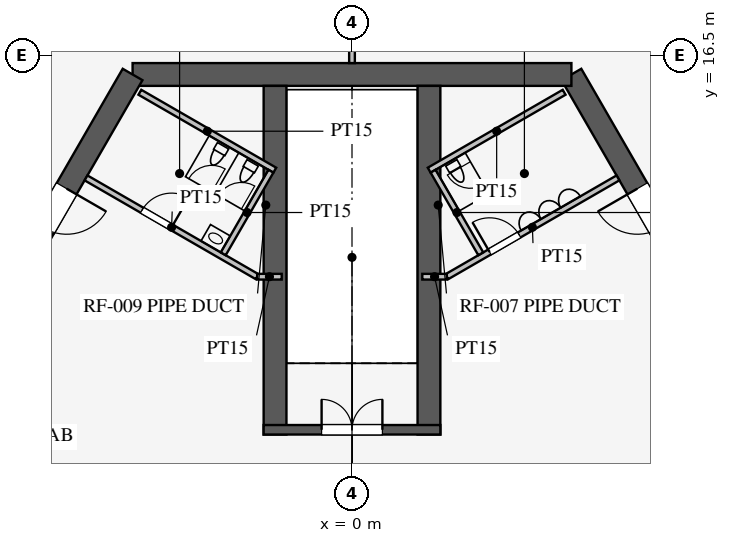
"""IFC4 building model, lengths in metres.
Left out: names, types, materials, properties, quantities, classifications, styles, units other than length and angle.
Written with IfcOpenShell. Run it as: python <this file> out.ifc"""

import sys

from ifc_helpers import new_model, si_unit, direction, frame, frame_2d, origin, place, context, subcontext, project, spatial, polyline, rectangle, outline, extrude, element, fill, save


model = new_model("IFC4")
c1 = context("Model", 3, precision=1e-05, world=origin(), true_north=direction((0.0, 1.0)))
c2 = subcontext(c1, "Body", "Model", "MODEL_VIEW")
j1 = project(units=[si_unit("LENGTHUNIT", "METRE"), si_unit("PLANEANGLEUNIT", "RADIAN")], contexts=[c1])
p1 = place(None, origin())
s1 = spatial("IfcSite", under=j1, at=p1, CompositionType="ELEMENT")
p2 = place(p1, origin())
s2 = spatial("IfcBuilding", under=s1, at=p2, CompositionType="ELEMENT")
p3 = place(p2, frame((0.0, 0.0, 328.5)))
s3 = spatial("IfcBuildingStorey", under=s2, at=p3, CompositionType="ELEMENT", Elevation=328.5)
p4 = place(p3, frame((16.743, -3.0, 0.0), z_axis=(0.0, 0.0, 1.0), x_axis=(-0.500002442456, 0.866023993627, 0.0)))
e1 = element("IfcWall", 1, at=p4, inside=s3, PredefinedType="SHEAR", context=c2, shape_type="SweptSolid", body=[
    extrude(outline(polyline([(0.0, 0.0), (21.939, 0.0), (21.939, 21.833), (0.0, 12.973), (0.0, 0.0)])), frame((0.0, 0.3, 0.0), z_axis=(0.0, -1.0, 0.0), x_axis=(1.0, 0.0, 0.0)), (0.0, 0.0, 1.0), 0.6),
])
p5 = place(p4, frame((17.27, 0.0, 0.0)))
e2 = element("IfcOpeningElement", 2, at=p5, cuts=e1, PredefinedType="OPENING", context=c2, shape_type="SweptSolid", body=[
    extrude(rectangle(XDim=1.2, YDim=2.1, at=frame_2d((0.6, 1.05))), frame((0.0, 0.31, 0.0), z_axis=(0.0, -1.0, 0.0), x_axis=(1.0, 0.0, 0.0)), (0.0, 0.0, 1.0), 0.62),
])
p6 = place(p4, frame((3.47, 0.0, 0.0)))
e3 = element("IfcOpeningElement", 3, at=p6, cuts=e1, PredefinedType="OPENING", context=c2, shape_type="SweptSolid", body=[
    extrude(rectangle(XDim=1.2, YDim=2.1, at=frame_2d((0.6, 1.05))), frame((0.0, 0.31, 0.0), z_axis=(0.0, -1.0, 0.0), x_axis=(1.0, 0.0, 0.0)), (0.0, 0.0, 1.0), 0.62),
])
p7 = place(p3, frame((5.773, 16.0, 0.0), z_axis=(0.0, 0.0, 1.0), x_axis=(-1.0, 0.0, 0.0)))
e4 = element("IfcWall", 4, at=p7, inside=s3, PredefinedType="SHEAR", context=c2, shape_type="SweptSolid", body=[
    extrude(outline(polyline([(0.0, 0.0), (11.547, 0.0), (11.547, 21.833), (0.0, 21.833), (0.0, 0.0)])), frame((0.0, 0.3, 0.0), z_axis=(0.0, -1.0, 0.0), x_axis=(1.0, 0.0, 0.0)), (0.0, 0.0, 1.0), 0.6),
])
p8 = place(p3, frame((-5.773, 16.0, 0.0), z_axis=(0.0, 0.0, 1.0), x_axis=(-0.500002442456, -0.866023993627, 0.0)))
e5 = element("IfcWall", 5, at=p8, inside=s3, PredefinedType="SHEAR", context=c2, shape_type="SweptSolid", body=[
    extrude(outline(polyline([(0.0, 0.0), (21.939, 0.0), (21.939, 12.973), (0.0, 21.833), (0.0, 0.0)])), frame((0.0, 0.3, 0.0), z_axis=(0.0, -1.0, 0.0), x_axis=(1.0, 0.0, 0.0)), (0.0, 0.0, 1.0), 0.6),
])
p9 = place(p8, frame((17.27, 0.0, 0.0)))
e6 = element("IfcOpeningElement", 6, at=p9, cuts=e5, PredefinedType="OPENING", context=c2, shape_type="SweptSolid", body=[
    extrude(rectangle(XDim=1.2, YDim=2.1, at=frame_2d((0.6, 1.05))), frame((0.0, 0.31, 0.0), z_axis=(0.0, -1.0, 0.0), x_axis=(1.0, 0.0, 0.0)), (0.0, 0.0, 1.0), 0.62),
])
p10 = place(p8, frame((3.47, 0.0, 0.0)))
e7 = element("IfcOpeningElement", 7, at=p10, cuts=e5, PredefinedType="OPENING", context=c2, shape_type="SweptSolid", body=[
    extrude(rectangle(XDim=1.2, YDim=2.1, at=frame_2d((0.6, 1.05))), frame((0.0, 0.31, 0.0), z_axis=(0.0, -1.0, 0.0), x_axis=(1.0, 0.0, 0.0)), (0.0, 0.0, 1.0), 0.62),
])
for number, where, z_axis, x_axis in (
    (8, (2.025, 6.525, 0.0), (0.0, 0.0, 1.0), (0.0, 1.0, 0.0)),
    (9, (-2.025, 6.525, 0.0), (0.0, 0.0, 1.0), (0.0, 1.0, 0.0)),
):
    element("IfcWall", number, at=place(p3, frame(where, z_axis=z_axis, x_axis=x_axis)), inside=s3, PredefinedType="SHEAR", context=c2, shape_type="SweptSolid", body=[
        extrude(rectangle(XDim=9.175, YDim=0.6, at=frame_2d((4.587, 0.0))), origin(), (0.0, 0.0, 1.0), 3.2),
    ])
p11 = place(p3, frame((2.325, 6.65, 0.0), z_axis=(0.0, 0.0, 1.0), x_axis=(-1.0, 0.0, 0.0)))
e10 = element("IfcWall", 10, at=p11, inside=s3, PredefinedType="SHEAR", context=c2, shape_type="SweptSolid", body=[
    extrude(rectangle(XDim=4.65, YDim=0.25, at=frame_2d((2.325, 0.0))), origin(), (0.0, 0.0, 1.0), 3.2),
])
p12 = place(p11, frame((1.525, 0.0, 0.0)))
e11 = element("IfcOpeningElement", 11, at=p12, cuts=e10, PredefinedType="OPENING", context=c2, shape_type="SweptSolid", body=[
    extrude(rectangle(XDim=1.6, YDim=2.1, at=frame_2d((0.8, 1.05))), frame((0.0, 0.135, 0.0), z_axis=(0.0, -1.0, 0.0), x_axis=(1.0, 0.0, 0.0)), (0.0, 0.0, 1.0), 0.27),
])
p13 = place(p3, frame((2.495, 10.678, 0.0), z_axis=(0.0, 0.0, 1.0), x_axis=(0.866021400173, 0.500006934395, 0.0)))
e12 = element("IfcWall", 12, at=p13, inside=s3, PredefinedType="PARTITIONING", context=c2, shape_type="SweptSolid", body=[
    extrude(rectangle(XDim=5.2, YDim=0.15, at=frame_2d((2.6, 0.0))), origin(), (0.0, 0.0, 1.0), 3.2),
])
p14 = place(p13, frame((1.3, 0.0, 0.0)))
e13 = element("IfcOpeningElement", 13, at=p14, cuts=e12, PredefinedType="OPENING", context=c2, shape_type="SweptSolid", body=[
    extrude(rectangle(XDim=0.9, YDim=2.1, at=frame_2d((0.45, 1.05))), frame((0.0, 0.085, 0.0), z_axis=(0.0, -1.0, 0.0), x_axis=(1.0, 0.0, 0.0)), (0.0, 0.0, 1.0), 0.17),
])
p15 = place(p3, frame((-2.495, 10.678, 0.0), z_axis=(0.0, 0.0, 1.0), x_axis=(-0.866021400173, 0.500006934395, 0.0)))
e14 = element("IfcWall", 14, at=p15, inside=s3, PredefinedType="PARTITIONING", context=c2, shape_type="SweptSolid", body=[
    extrude(rectangle(XDim=5.2, YDim=0.15, at=frame_2d((2.6, 0.0))), origin(), (0.0, 0.0, 1.0), 3.2),
])
p16 = place(p15, frame((2.6, 0.0, 0.0)))
e15 = element("IfcOpeningElement", 15, at=p16, cuts=e14, PredefinedType="OPENING", context=c2, shape_type="SweptSolid", body=[
    extrude(rectangle(XDim=0.9, YDim=2.1, at=frame_2d((0.45, 1.05))), frame((0.0, 0.085, 0.0), z_axis=(0.0, -1.0, 0.0), x_axis=(1.0, 0.0, 0.0)), (0.0, 0.0, 1.0), 0.17),
])
for number, where, z_axis, x_axis in (
    (16, (2.495, 10.678, 0.0), (0.0, 0.0, 1.0), (-1.0, 0.0, 0.0)),
    (17, (-2.495, 10.678, 0.0), (0.0, 0.0, 1.0), (1.0, 0.0, 0.0)),
):
    element("IfcWall", number, at=place(p3, frame(where, z_axis=z_axis, x_axis=x_axis)), inside=s3, PredefinedType="PARTITIONING", context=c2, shape_type="SweptSolid", body=[
        extrude(rectangle(XDim=0.645, YDim=0.15, at=frame_2d((0.323, 0.0))), origin(), (0.0, 0.0, 1.0), 3.2),
    ])
p17 = place(p3, frame((2.031, 13.482, 0.0), z_axis=(0.0, 0.0, 1.0), x_axis=(0.866050731258, 0.499956128963, 0.0)))
e18 = element("IfcWall", 18, at=p17, inside=s3, PredefinedType="PARTITIONING", context=c2, shape_type="SweptSolid", body=[
    extrude(rectangle(XDim=4.1, YDim=0.15, at=frame_2d((2.05, 0.0))), origin(), (0.0, 0.0, 1.0), 3.2),
])
p18 = place(p3, frame((3.389, 11.281, 0.0), z_axis=(0.0, 0.0, 1.0), x_axis=(-0.499989096993, 0.866031698547, 0.0)))
e19 = element("IfcWall", 19, at=p18, inside=s3, PredefinedType="PARTITIONING", context=c2, shape_type="SweptSolid", body=[
    extrude(rectangle(XDim=2.51, YDim=0.15, at=frame_2d((1.255, 0.0))), origin(), (0.0, 0.0, 1.0), 3.2),
])
p19 = place(p3, frame((-2.031, 13.482, 0.0), z_axis=(0.0, 0.0, 1.0), x_axis=(-0.866050731258, 0.499956128963, 0.0)))
e20 = element("IfcWall", 20, at=p19, inside=s3, PredefinedType="PARTITIONING", context=c2, shape_type="SweptSolid", body=[
    extrude(rectangle(XDim=4.1, YDim=0.15, at=frame_2d((2.05, 0.0))), origin(), (0.0, 0.0, 1.0), 3.2),
])
p20 = place(p3, frame((-3.389, 11.281, 0.0), z_axis=(0.0, 0.0, 1.0), x_axis=(0.499989096993, 0.866031698547, 0.0)))
e21 = element("IfcWall", 21, at=p20, inside=s3, PredefinedType="PARTITIONING", context=c2, shape_type="SweptSolid", body=[
    extrude(rectangle(XDim=2.51, YDim=0.15, at=frame_2d((1.255, 0.0))), origin(), (0.0, 0.0, 1.0), 3.2),
])
p21 = place(p3, frame((0.0, 16.3, 0.0), z_axis=(0.0, 0.0, 1.0), x_axis=(0.0, 1.0, 0.0)))
e22 = element("IfcWall", 22, at=p21, inside=s3, PredefinedType="PARTITIONING", context=c2, shape_type="SweptSolid", body=[
    extrude(rectangle(XDim=13.45, YDim=0.15, at=frame_2d((6.725, 0.0))), origin(), (0.0, 0.0, 1.0), 3.2),
])
p22 = place(p14, origin())
e23 = element("IfcDoor", 23, at=p22, inside=s3, OperationType="SINGLE_SWING_LEFT", PredefinedType="DOOR", context=c2, shape_type="SweptSolid", body=[
    extrude(rectangle(XDim=0.9, YDim=2.1, at=frame_2d((0.45, 1.05))), frame((0.0, 0.025, 0.0), z_axis=(0.0, -1.0, 0.0), x_axis=(1.0, 0.0, 0.0)), (0.0, 0.0, 1.0), 0.05),
])
fill(e13, e23)
p23 = place(p16, frame((0.9, 0.0, 0.0), z_axis=(0.0, 0.0, 1.0), x_axis=(-1.0, 0.0, 0.0)))
e24 = element("IfcDoor", 24, at=p23, inside=s3, OperationType="SINGLE_SWING_RIGHT", PredefinedType="DOOR", context=c2, shape_type="SweptSolid", body=[
    extrude(rectangle(XDim=0.9, YDim=2.1, at=frame_2d((0.45, 1.05))), frame((0.0, 0.025, 0.0), z_axis=(0.0, -1.0, 0.0), x_axis=(1.0, 0.0, 0.0)), (0.0, 0.0, 1.0), 0.05),
])
fill(e15, e24)
p24 = place(p12, frame((1.6, 0.0, 0.0), z_axis=(0.0, 0.0, 1.0), x_axis=(-1.0, 0.0, 0.0)))
e25 = element("IfcDoor", 25, at=p24, inside=s3, OperationType="DOUBLE_DOOR_SINGLE_SWING", PredefinedType="DOOR", context=c2, shape_type="SweptSolid", body=[
    extrude(rectangle(XDim=1.6, YDim=2.1, at=frame_2d((0.8, 1.05))), frame((0.0, 0.025, 0.0), z_axis=(0.0, -1.0, 0.0), x_axis=(1.0, 0.0, 0.0)), (0.0, 0.0, 1.0), 0.05),
])
fill(e11, e25)
p25 = place(p5, origin())
e26 = element("IfcDoor", 26, at=p25, inside=s3, OperationType="SINGLE_SWING_RIGHT", PredefinedType="DOOR", context=c2, shape_type="SweptSolid", body=[
    extrude(rectangle(XDim=1.2, YDim=2.1, at=frame_2d((0.6, 1.05))), frame((0.0, 0.025, 0.0), z_axis=(0.0, -1.0, 0.0), x_axis=(1.0, 0.0, 0.0)), (0.0, 0.0, 1.0), 0.05),
])
fill(e2, e26)
p26 = place(p10, origin())
e27 = element("IfcDoor", 27, at=p26, inside=s3, OperationType="SINGLE_SWING_LEFT", PredefinedType="DOOR", context=c2, shape_type="SweptSolid", body=[
    extrude(rectangle(XDim=1.2, YDim=2.1, at=frame_2d((0.6, 1.05))), frame((0.0, 0.025, 0.0), z_axis=(0.0, -1.0, 0.0), x_axis=(1.0, 0.0, 0.0)), (0.0, 0.0, 1.0), 0.05),
])
fill(e7, e27)
save(model, sys.argv[1])
